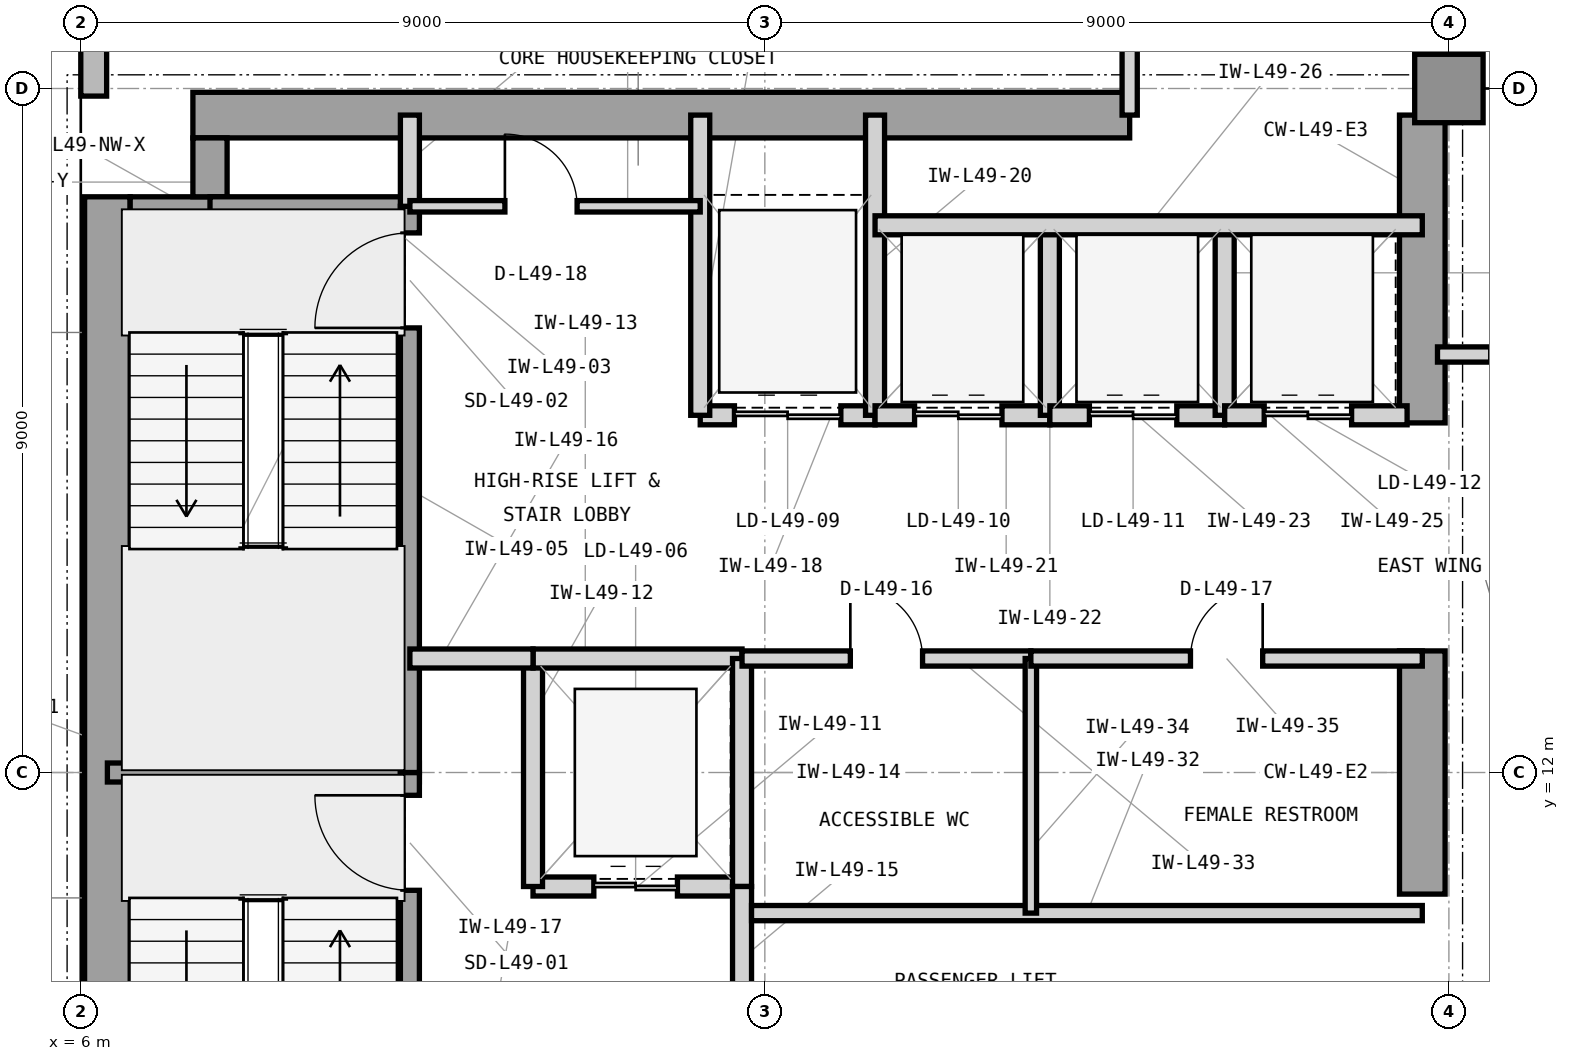
"""IFC4 building model, lengths in metres.
Left out: names, types, materials, properties, quantities, classifications, styles, units other than length and angle.
Written with IfcOpenShell. Run it as: python <this file> out.ifc"""

import sys

from ifc_helpers import new_model, si_unit, direction, frame, frame_2d, origin, origin_2d, place, context, subcontext, project, spatial, rectangle, extrude, element, fill, save


model = new_model("IFC4")
c1 = context("Model", 3, precision=1e-05, world=origin(), true_north=direction((0.0, 1.0)))
c2 = subcontext(c1, "Body", "Model", "MODEL_VIEW")
j1 = project(units=[si_unit("LENGTHUNIT", "METRE"), si_unit("PLANEANGLEUNIT", "RADIAN")], contexts=[c1])
p1 = place(None, origin())
s1 = spatial("IfcSite", under=j1, at=p1, CompositionType="ELEMENT")
p2 = place(p1, origin())
s2 = spatial("IfcBuilding", under=s1, at=p2, CompositionType="ELEMENT")
p3 = place(p2, frame((0.0, 0.0, 203.4)))
s3 = spatial("IfcBuildingStorey", under=s2, at=p3, CompositionType="ELEMENT", Elevation=203.4)
p4 = place(p3, frame((6.35, 4.425, 0.0), z_axis=(0.0, 0.0, 1.0), x_axis=(0.0, 1.0, 0.0)))
e1 = element("IfcWall", 1, at=p4, inside=s3, PredefinedType="SHEAR", context=c2, shape_type="SweptSolid", body=[
    extrude(rectangle(XDim=15.15, YDim=0.6, at=frame_2d((7.575, 0.0))), origin(), (0.0, 0.0, 1.0), 3.9),
])
p5 = place(p3, frame((7.475, 20.65, 0.0), z_axis=(0.0, 0.0, 1.0), x_axis=(1.0, 0.0, 0.0)))
e2 = element("IfcWall", 2, at=p5, inside=s3, PredefinedType="SHEAR", context=c2, shape_type="SweptSolid", body=[
    extrude(rectangle(XDim=12.325, YDim=0.6, at=frame_2d((6.163, 0.0))), origin(), (0.0, 0.0, 1.0), 3.9),
])
p6 = place(p3, frame((23.65, 10.4, 0.0), z_axis=(0.0, 0.0, 1.0), x_axis=(0.0, 1.0, 0.0)))
e3 = element("IfcWall", 3, at=p6, inside=s3, PredefinedType="SHEAR", context=c2, shape_type="SweptSolid", body=[
    extrude(rectangle(XDim=3.2, YDim=0.6, at=frame_2d((1.6, 0.0))), origin(), (0.0, 0.0, 1.0), 3.9),
])
p7 = place(p3, frame((23.65, 16.6, 0.0), z_axis=(0.0, 0.0, 1.0), x_axis=(0.0, 1.0, 0.0)))
e4 = element("IfcWall", 4, at=p7, inside=s3, PredefinedType="SHEAR", context=c2, shape_type="SweptSolid", body=[
    extrude(rectangle(XDim=4.05, YDim=0.6, at=frame_2d((2.025, 0.0))), origin(), (0.0, 0.0, 1.0), 3.9),
])
p8 = place(p3, frame((6.65, 19.35, 0.0), z_axis=(0.0, 0.0, 1.0), x_axis=(1.0, 0.0, 0.0)))
e5 = element("IfcWall", 5, at=p8, inside=s3, PredefinedType="SHEAR", context=c2, shape_type="SweptSolid", body=[
    extrude(rectangle(XDim=1.275, YDim=0.45, at=frame_2d((0.638, 0.0))), origin(), (0.0, 0.0, 1.0), 3.9),
])
p9 = place(p3, frame((7.7, 19.575, 0.0), z_axis=(0.0, 0.0, 1.0), x_axis=(0.0, 1.0, 0.0)))
e6 = element("IfcWall", 6, at=p9, inside=s3, PredefinedType="SHEAR", context=c2, shape_type="SweptSolid", body=[
    extrude(rectangle(XDim=0.775, YDim=0.45, at=frame_2d((0.388, 0.0))), origin(), (0.0, 0.0, 1.0), 3.9),
])
p10 = place(p3, frame((24.0, 21.0, 0.0), z_axis=(0.0, 0.0, 1.0), x_axis=(1.0, 0.0, 0.0)))
e7 = element("IfcColumn", 7, at=p10, inside=s3, PredefinedType="COLUMN", context=c2, shape_type="SweptSolid", body=[
    extrude(rectangle(XDim=0.9, YDim=0.9, at=origin_2d()), origin(), (0.0, 0.0, 1.0), 3.9),
])
p11 = place(p3, frame((23.83, 21.0, 0.0), z_axis=(0.0, 0.0, 1.0), x_axis=(0.0, 1.0, 0.0)))
e8 = element("IfcWall", 8, at=p11, inside=s3, PredefinedType="STANDARD", context=c2, shape_type="SweptSolid", body=[
    extrude(rectangle(XDim=19.4, YDim=0.34, at=frame_2d((9.7, 0.0))), origin(), (0.0, 0.0, 1.0), 3.7),
])
p12 = place(p3, frame((6.17, 40.4, 0.0), z_axis=(0.0, 0.0, 1.0), x_axis=(0.0, -1.0, 0.0)))
e9 = element("IfcWall", 9, at=p12, inside=s3, PredefinedType="STANDARD", context=c2, shape_type="SweptSolid", body=[
    extrude(rectangle(XDim=19.5, YDim=0.34, at=frame_2d((9.75, 0.0))), origin(), (0.0, 0.0, 1.0), 3.7),
])
p13 = place(p12, frame((7.125, 0.0, 0.9)))
e10 = element("IfcOpeningElement", 10, at=p13, cuts=e9, PredefinedType="OPENING", context=c2, shape_type="SweptSolid", body=[
    extrude(rectangle(XDim=2.3, YDim=2.2, at=frame_2d((1.15, 1.1))), frame((0.0, 0.18, 0.0), z_axis=(0.0, -1.0, 0.0), x_axis=(1.0, 0.0, 0.0)), (0.0, 0.0, 1.0), 0.36),
])
p14 = place(p3, frame((6.35, 12.0, 0.0), z_axis=(0.0, 0.0, 1.0), x_axis=(1.0, 0.0, 0.0)))
e11 = element("IfcWall", 11, at=p14, inside=s3, PredefinedType="SHEAR", context=c2, shape_type="SweptSolid", body=[
    extrude(rectangle(XDim=4.105, YDim=0.25, at=frame_2d((2.052, 0.0))), origin(), (0.0, 0.0, 1.0), 3.9),
])
p15 = place(p3, frame((7.7, 19.45, 0.0), z_axis=(0.0, 0.0, 1.0), x_axis=(1.0, 0.0, 0.0)))
e12 = element("IfcWall", 12, at=p15, inside=s3, PredefinedType="SHEAR", context=c2, shape_type="SweptSolid", body=[
    extrude(rectangle(XDim=2.755, YDim=0.25, at=frame_2d((1.377, 0.0))), origin(), (0.0, 0.0, 1.0), 3.9),
])
p16 = place(p3, frame((10.33, 4.55, 0.0), z_axis=(0.0, 0.0, 1.0), x_axis=(0.0, 1.0, 0.0)))
e13 = element("IfcWall", 13, at=p16, inside=s3, PredefinedType="SHEAR", context=c2, shape_type="SweptSolid", body=[
    extrude(rectangle(XDim=7.45, YDim=0.25, at=frame_2d((3.725, 0.0))), origin(), (0.0, 0.0, 1.0), 3.9),
])
p17 = place(p16, frame((5.9, 0.0, 0.0)))
e14 = element("IfcOpeningElement", 14, at=p17, cuts=e13, PredefinedType="OPENING", context=c2, shape_type="SweptSolid", body=[
    extrude(rectangle(XDim=1.25, YDim=2.2, at=frame_2d((0.625, 1.1))), frame((0.0, 0.135, 0.0), z_axis=(0.0, -1.0, 0.0), x_axis=(1.0, 0.0, 0.0)), (0.0, 0.0, 1.0), 0.27),
])
p18 = place(p3, frame((10.33, 12.0, 0.0), z_axis=(0.0, 0.0, 1.0), x_axis=(0.0, 1.0, 0.0)))
e15 = element("IfcWall", 15, at=p18, inside=s3, PredefinedType="SHEAR", context=c2, shape_type="SweptSolid", body=[
    extrude(rectangle(XDim=7.45, YDim=0.25, at=frame_2d((3.725, 0.0))), origin(), (0.0, 0.0, 1.0), 3.9),
])
p19 = place(p18, frame((5.85, 0.0, 0.0)))
e16 = element("IfcOpeningElement", 16, at=p19, cuts=e15, PredefinedType="OPENING", context=c2, shape_type="SweptSolid", body=[
    extrude(rectangle(XDim=1.25, YDim=2.2, at=frame_2d((0.625, 1.1))), frame((0.0, 0.135, 0.0), z_axis=(0.0, -1.0, 0.0), x_axis=(1.0, 0.0, 0.0)), (0.0, 0.0, 1.0), 0.27),
])
p20 = place(p3, frame((10.33, 19.45, 0.0), z_axis=(0.0, 0.0, 1.0), x_axis=(0.0, 1.0, 0.0)))
e17 = element("IfcWall", 17, at=p20, inside=s3, PredefinedType="PARTITIONING", context=c2, shape_type="SweptSolid", body=[
    extrude(rectangle(XDim=1.2, YDim=0.25, at=frame_2d((0.6, 0.0))), origin(), (0.0, 0.0, 1.0), 3.69),
])
p21 = place(p3, frame((11.95, 10.5, 0.0), z_axis=(0.0, 0.0, 1.0), x_axis=(1.0, 0.0, 0.0)))
e18 = element("IfcWall", 18, at=p21, inside=s3, PredefinedType="PARTITIONING", context=c2, shape_type="SweptSolid", body=[
    extrude(rectangle(XDim=2.75, YDim=0.25, at=frame_2d((1.375, 0.0))), origin(), (0.0, 0.0, 1.0), 3.283),
])
p22 = place(p21, frame((0.8, 0.0, 0.0)))
e19 = element("IfcOpeningElement", 19, at=p22, cuts=e18, PredefinedType="OPENING", context=c2, shape_type="SweptSolid", body=[
    extrude(rectangle(XDim=1.1, YDim=2.25, at=frame_2d((0.55, 1.125))), frame((0.0, 0.135, 0.0), z_axis=(0.0, -1.0, 0.0), x_axis=(1.0, 0.0, 0.0)), (0.0, 0.0, 1.0), 0.27),
])
p23 = place(p3, frame((11.95, 10.5, 0.0), z_axis=(0.0, 0.0, 1.0), x_axis=(0.0, 1.0, 0.0)))
e20 = element("IfcWall", 20, at=p23, inside=s3, PredefinedType="PARTITIONING", context=c2, shape_type="SweptSolid", body=[
    extrude(rectangle(XDim=3.0, YDim=0.25, at=frame_2d((1.5, 0.0))), origin(), (0.0, 0.0, 1.0), 3.69),
])
p24 = place(p3, frame((11.95, 13.5, 0.0), z_axis=(0.0, 0.0, 1.0), x_axis=(1.0, 0.0, 0.0)))
e21 = element("IfcWall", 21, at=p24, inside=s3, PredefinedType="PARTITIONING", context=c2, shape_type="SweptSolid", body=[
    extrude(rectangle(XDim=2.75, YDim=0.25, at=frame_2d((1.375, 0.0))), origin(), (0.0, 0.0, 1.0), 3.283),
])
p25 = place(p3, frame((14.7, 10.5, 0.0), z_axis=(0.0, 0.0, 1.0), x_axis=(0.0, 1.0, 0.0)))
e22 = element("IfcWall", 22, at=p25, inside=s3, PredefinedType="PARTITIONING", context=c2, shape_type="SweptSolid", body=[
    extrude(rectangle(XDim=3.0, YDim=0.25, at=frame_2d((1.5, 0.0))), origin(), (0.0, 0.0, 1.0), 3.69),
])
p26 = place(p3, frame((14.7, 6.7, 0.0), z_axis=(0.0, 0.0, 1.0), x_axis=(0.0, 1.0, 0.0)))
e23 = element("IfcWall", 23, at=p26, inside=s3, PredefinedType="PARTITIONING", context=c2, shape_type="SweptSolid", body=[
    extrude(rectangle(XDim=3.8, YDim=0.25, at=frame_2d((1.9, 0.0))), origin(), (0.0, 0.0, 1.0), 3.69),
])
p27 = place(p26, frame((1.3, 0.0, 0.0)))
e24 = element("IfcOpeningElement", 24, at=p27, cuts=e23, PredefinedType="OPENING", context=c2, shape_type="SweptSolid", body=[
    extrude(rectangle(XDim=1.2, YDim=2.2, at=frame_2d((0.6, 1.1))), frame((0.0, 0.135, 0.0), z_axis=(0.0, -1.0, 0.0), x_axis=(1.0, 0.0, 0.0)), (0.0, 0.0, 1.0), 0.27),
])
p28 = place(p3, frame((10.33, 13.5, 0.0), z_axis=(0.0, 0.0, 1.0), x_axis=(1.0, 0.0, 0.0)))
e25 = element("IfcWall", 25, at=p28, inside=s3, PredefinedType="PARTITIONING", context=c2, shape_type="SweptSolid", body=[
    extrude(rectangle(XDim=1.62, YDim=0.25, at=frame_2d((0.81, 0.0))), origin(), (0.0, 0.0, 1.0), 3.283),
])
p29 = place(p3, frame((14.15, 16.7, 0.0), z_axis=(0.0, 0.0, 1.0), x_axis=(1.0, 0.0, 0.0)))
e26 = element("IfcWall", 26, at=p29, inside=s3, PredefinedType="PARTITIONING", context=c2, shape_type="SweptSolid", body=[
    extrude(rectangle(XDim=2.3, YDim=0.25, at=frame_2d((1.15, 0.0))), origin(), (0.0, 0.0, 1.0), 3.283),
])
p30 = place(p29, frame((0.45, 0.0, 0.0)))
e27 = element("IfcOpeningElement", 27, at=p30, cuts=e26, PredefinedType="OPENING", context=c2, shape_type="SweptSolid", body=[
    extrude(rectangle(XDim=1.4, YDim=2.35, at=frame_2d((0.7, 1.175))), frame((0.0, 0.135, 0.0), z_axis=(0.0, -1.0, 0.0), x_axis=(1.0, 0.0, 0.0)), (0.0, 0.0, 1.0), 0.27),
])
for number, where, z_axis, x_axis in (
    (28, (14.15, 16.7, 0.0), (0.0, 0.0, 1.0), (0.0, 1.0, 0.0)),
    (29, (16.45, 16.7, 0.0), (0.0, 0.0, 1.0), (0.0, 1.0, 0.0)),
):
    element("IfcWall", number, at=place(p3, frame(where, z_axis=z_axis, x_axis=x_axis)), inside=s3, PredefinedType="PARTITIONING", context=c2, shape_type="SweptSolid", body=[
        extrude(rectangle(XDim=3.95, YDim=0.25, at=frame_2d((1.975, 0.0))), origin(), (0.0, 0.0, 1.0), 3.69),
    ])
p31 = place(p3, frame((16.45, 16.7, 0.0), z_axis=(0.0, 0.0, 1.0), x_axis=(1.0, 0.0, 0.0)))
e30 = element("IfcWall", 30, at=p31, inside=s3, PredefinedType="PARTITIONING", context=c2, shape_type="SweptSolid", body=[
    extrude(rectangle(XDim=2.3, YDim=0.25, at=frame_2d((1.15, 0.0))), origin(), (0.0, 0.0, 1.0), 3.283),
])
p32 = place(p31, frame((0.52, 0.0, 0.0)))
e31 = element("IfcOpeningElement", 31, at=p32, cuts=e30, PredefinedType="OPENING", context=c2, shape_type="SweptSolid", body=[
    extrude(rectangle(XDim=1.15, YDim=2.25, at=frame_2d((0.575, 1.125))), frame((0.0, 0.135, 0.0), z_axis=(0.0, -1.0, 0.0), x_axis=(1.0, 0.0, 0.0)), (0.0, 0.0, 1.0), 0.27),
])
p33 = place(p3, frame((18.75, 16.7, 0.0), z_axis=(0.0, 0.0, 1.0), x_axis=(0.0, 1.0, 0.0)))
e32 = element("IfcWall", 32, at=p33, inside=s3, PredefinedType="PARTITIONING", context=c2, shape_type="SweptSolid", body=[
    extrude(rectangle(XDim=2.5, YDim=0.25, at=frame_2d((1.25, 0.0))), origin(), (0.0, 0.0, 1.0), 3.69),
])
p34 = place(p3, frame((18.75, 16.7, 0.0), z_axis=(0.0, 0.0, 1.0), x_axis=(1.0, 0.0, 0.0)))
e33 = element("IfcWall", 33, at=p34, inside=s3, PredefinedType="PARTITIONING", context=c2, shape_type="SweptSolid", body=[
    extrude(rectangle(XDim=2.3, YDim=0.25, at=frame_2d((1.15, 0.0))), origin(), (0.0, 0.0, 1.0), 3.283),
])
p35 = place(p34, frame((0.52, 0.0, 0.0)))
e34 = element("IfcOpeningElement", 34, at=p35, cuts=e33, PredefinedType="OPENING", context=c2, shape_type="SweptSolid", body=[
    extrude(rectangle(XDim=1.15, YDim=2.25, at=frame_2d((0.575, 1.125))), frame((0.0, 0.135, 0.0), z_axis=(0.0, -1.0, 0.0), x_axis=(1.0, 0.0, 0.0)), (0.0, 0.0, 1.0), 0.27),
])
p36 = place(p3, frame((21.05, 16.7, 0.0), z_axis=(0.0, 0.0, 1.0), x_axis=(0.0, 1.0, 0.0)))
e35 = element("IfcWall", 35, at=p36, inside=s3, PredefinedType="PARTITIONING", context=c2, shape_type="SweptSolid", body=[
    extrude(rectangle(XDim=2.5, YDim=0.25, at=frame_2d((1.25, 0.0))), origin(), (0.0, 0.0, 1.0), 3.69),
])
p37 = place(p3, frame((21.05, 16.7, 0.0), z_axis=(0.0, 0.0, 1.0), x_axis=(1.0, 0.0, 0.0)))
e36 = element("IfcWall", 36, at=p37, inside=s3, PredefinedType="PARTITIONING", context=c2, shape_type="SweptSolid", body=[
    extrude(rectangle(XDim=2.4, YDim=0.25, at=frame_2d((1.2, 0.0))), origin(), (0.0, 0.0, 1.0), 3.283),
])
p38 = place(p37, frame((0.52, 0.0, 0.0)))
e37 = element("IfcOpeningElement", 37, at=p38, cuts=e36, PredefinedType="OPENING", context=c2, shape_type="SweptSolid", body=[
    extrude(rectangle(XDim=1.15, YDim=2.25, at=frame_2d((0.575, 1.125))), frame((0.0, 0.135, 0.0), z_axis=(0.0, -1.0, 0.0), x_axis=(1.0, 0.0, 0.0)), (0.0, 0.0, 1.0), 0.27),
])
p39 = place(p3, frame((16.45, 19.2, 0.0), z_axis=(0.0, 0.0, 1.0), x_axis=(1.0, 0.0, 0.0)))
e38 = element("IfcWall", 38, at=p39, inside=s3, PredefinedType="PARTITIONING", context=c2, shape_type="SweptSolid", body=[
    extrude(rectangle(XDim=7.2, YDim=0.25, at=frame_2d((3.6, 0.0))), origin(), (0.0, 0.0, 1.0), 3.69),
])
p40 = place(p3, frame((14.825, 10.15, 0.0), z_axis=(0.0, 0.0, 1.0), x_axis=(1.0, 0.0, 0.0)))
e39 = element("IfcWall", 39, at=p40, inside=s3, PredefinedType="PARTITIONING", context=c2, shape_type="SweptSolid", body=[
    extrude(rectangle(XDim=8.825, YDim=0.2, at=frame_2d((4.413, 0.0))), origin(), (0.0, 0.0, 1.0), 3.69),
])
p41 = place(p3, frame((14.7, 13.5, 0.0), z_axis=(0.0, 0.0, 1.0), x_axis=(1.0, 0.0, 0.0)))
e40 = element("IfcWall", 40, at=p41, inside=s3, PredefinedType="PARTITIONING", context=c2, shape_type="SweptSolid", body=[
    extrude(rectangle(XDim=3.8, YDim=0.2, at=frame_2d((1.9, 0.0))), origin(), (0.0, 0.0, 1.0), 3.283),
])
p42 = place(p41, frame((1.425, 0.0, 0.0)))
e41 = element("IfcOpeningElement", 41, at=p42, cuts=e40, PredefinedType="OPENING", context=c2, shape_type="SweptSolid", body=[
    extrude(rectangle(XDim=0.95, YDim=2.1, at=frame_2d((0.475, 1.05))), frame((0.0, 0.11, 0.0), z_axis=(0.0, -1.0, 0.0), x_axis=(1.0, 0.0, 0.0)), (0.0, 0.0, 1.0), 0.22),
])
p43 = place(p3, frame((18.5, 10.15, 0.0), z_axis=(0.0, 0.0, 1.0), x_axis=(0.0, 1.0, 0.0)))
e42 = element("IfcWall", 42, at=p43, inside=s3, PredefinedType="PARTITIONING", context=c2, shape_type="SweptSolid", body=[
    extrude(rectangle(XDim=3.35, YDim=0.15, at=frame_2d((1.675, 0.0))), origin(), (0.0, 0.0, 1.0), 3.69),
])
p44 = place(p3, frame((18.5, 13.5, 0.0), z_axis=(0.0, 0.0, 1.0), x_axis=(1.0, 0.0, 0.0)))
e43 = element("IfcWall", 43, at=p44, inside=s3, PredefinedType="PARTITIONING", context=c2, shape_type="SweptSolid", body=[
    extrude(rectangle(XDim=5.15, YDim=0.2, at=frame_2d((2.575, 0.0))), origin(), (0.0, 0.0, 1.0), 3.283),
])
p45 = place(p44, frame((2.1, 0.0, 0.0)))
e44 = element("IfcOpeningElement", 44, at=p45, cuts=e43, PredefinedType="OPENING", context=c2, shape_type="SweptSolid", body=[
    extrude(rectangle(XDim=0.95, YDim=2.1, at=frame_2d((0.475, 1.05))), frame((0.0, 0.11, 0.0), z_axis=(0.0, -1.0, 0.0), x_axis=(1.0, 0.0, 0.0)), (0.0, 0.0, 1.0), 0.22),
])
p46 = place(p3, frame((10.33, 19.45, 0.0), z_axis=(0.0, 0.0, 1.0), x_axis=(1.0, 0.0, 0.0)))
e45 = element("IfcWall", 45, at=p46, inside=s3, PredefinedType="PARTITIONING", context=c2, shape_type="SweptSolid", body=[
    extrude(rectangle(XDim=3.82, YDim=0.15, at=frame_2d((1.91, 0.0))), origin(), (0.0, 0.0, 1.0), 3.69),
])
p47 = place(p46, frame((1.25, 0.0, 0.0)))
e46 = element("IfcOpeningElement", 46, at=p47, cuts=e45, PredefinedType="OPENING", context=c2, shape_type="SweptSolid", body=[
    extrude(rectangle(XDim=0.95, YDim=2.1, at=frame_2d((0.475, 1.05))), frame((0.0, 0.085, 0.0), z_axis=(0.0, -1.0, 0.0), x_axis=(1.0, 0.0, 0.0)), (0.0, 0.0, 1.0), 0.17),
])
p48 = place(p3, frame((23.85, 17.5, 0.0), z_axis=(0.0, 0.0, 1.0), x_axis=(1.0, 0.0, 0.0)))
e47 = element("IfcWall", 47, at=p48, inside=s3, PredefinedType="PARTITIONING", context=c2, shape_type="SweptSolid", body=[
    extrude(rectangle(XDim=2.85, YDim=0.2, at=frame_2d((1.425, 0.0))), origin(), (0.0, 0.0, 1.0), 3.69),
])
p49 = place(p48, frame((0.7, 0.0, 0.0)))
e48 = element("IfcOpeningElement", 48, at=p49, cuts=e47, PredefinedType="OPENING", context=c2, shape_type="SweptSolid", body=[
    extrude(rectangle(XDim=1.0, YDim=2.15, at=frame_2d((0.5, 1.075))), frame((0.0, 0.11, 0.0), z_axis=(0.0, -1.0, 0.0), x_axis=(1.0, 0.0, 0.0)), (0.0, 0.0, 1.0), 0.22),
])
p50 = place(p3, frame((19.8, 20.65, 0.0), z_axis=(0.0, 0.0, 1.0), x_axis=(0.0, 1.0, 0.0)))
e49 = element("IfcWall", 49, at=p50, inside=s3, PredefinedType="PARTITIONING", context=c2, shape_type="SweptSolid", body=[
    extrude(rectangle(XDim=6.15, YDim=0.2, at=frame_2d((3.075, 0.0))), origin(), (0.0, 0.0, 1.0), 3.69),
])
p51 = place(p17, origin())
e50 = element("IfcDoor", 50, at=p51, inside=s3, OperationType="SINGLE_SWING_RIGHT", PredefinedType="DOOR", context=c2, shape_type="SweptSolid", body=[
    extrude(rectangle(XDim=1.25, YDim=2.2, at=frame_2d((0.625, 1.1))), frame((0.0, 0.025, 0.0), z_axis=(0.0, -1.0, 0.0), x_axis=(1.0, 0.0, 0.0)), (0.0, 0.0, 1.0), 0.05),
])
fill(e14, e50)
p52 = place(p19, origin())
e51 = element("IfcDoor", 51, at=p52, inside=s3, OperationType="SINGLE_SWING_LEFT", PredefinedType="DOOR", context=c2, shape_type="SweptSolid", body=[
    extrude(rectangle(XDim=1.25, YDim=2.2, at=frame_2d((0.625, 1.1))), frame((0.0, 0.025, 0.0), z_axis=(0.0, -1.0, 0.0), x_axis=(1.0, 0.0, 0.0)), (0.0, 0.0, 1.0), 0.05),
])
fill(e16, e51)
p53 = place(p22, origin())
e52 = element("IfcDoor", 52, at=p53, inside=s3, OperationType="DOUBLE_DOOR_SLIDING", PredefinedType="DOOR", context=c2, shape_type="SweptSolid", body=[
    extrude(rectangle(XDim=1.1, YDim=2.25, at=frame_2d((0.55, 1.125))), frame((0.0, 0.025, 0.0), z_axis=(0.0, -1.0, 0.0), x_axis=(1.0, 0.0, 0.0)), (0.0, 0.0, 1.0), 0.05),
])
fill(e19, e52)
p54 = place(p30, origin())
e53 = element("IfcDoor", 53, at=p54, inside=s3, OperationType="DOUBLE_DOOR_SLIDING", PredefinedType="DOOR", context=c2, shape_type="SweptSolid", body=[
    extrude(rectangle(XDim=1.4, YDim=2.35, at=frame_2d((0.7, 1.175))), frame((0.0, 0.025, 0.0), z_axis=(0.0, -1.0, 0.0), x_axis=(1.0, 0.0, 0.0)), (0.0, 0.0, 1.0), 0.05),
])
fill(e27, e53)
p55 = place(p32, origin())
e54 = element("IfcDoor", 54, at=p55, inside=s3, OperationType="DOUBLE_DOOR_SLIDING", PredefinedType="DOOR", context=c2, shape_type="SweptSolid", body=[
    extrude(rectangle(XDim=1.15, YDim=2.25, at=frame_2d((0.575, 1.125))), frame((0.0, 0.025, 0.0), z_axis=(0.0, -1.0, 0.0), x_axis=(1.0, 0.0, 0.0)), (0.0, 0.0, 1.0), 0.05),
])
fill(e31, e54)
p56 = place(p35, origin())
e55 = element("IfcDoor", 55, at=p56, inside=s3, OperationType="DOUBLE_DOOR_SLIDING", PredefinedType="DOOR", context=c2, shape_type="SweptSolid", body=[
    extrude(rectangle(XDim=1.15, YDim=2.25, at=frame_2d((0.575, 1.125))), frame((0.0, 0.025, 0.0), z_axis=(0.0, -1.0, 0.0), x_axis=(1.0, 0.0, 0.0)), (0.0, 0.0, 1.0), 0.05),
])
fill(e34, e55)
p57 = place(p38, origin())
e56 = element("IfcDoor", 56, at=p57, inside=s3, OperationType="DOUBLE_DOOR_SLIDING", PredefinedType="DOOR", context=c2, shape_type="SweptSolid", body=[
    extrude(rectangle(XDim=1.15, YDim=2.25, at=frame_2d((0.575, 1.125))), frame((0.0, 0.025, 0.0), z_axis=(0.0, -1.0, 0.0), x_axis=(1.0, 0.0, 0.0)), (0.0, 0.0, 1.0), 0.05),
])
fill(e37, e56)
p58 = place(p42, origin())
e57 = element("IfcDoor", 57, at=p58, inside=s3, OperationType="SINGLE_SWING_LEFT", PredefinedType="DOOR", context=c2, shape_type="SweptSolid", body=[
    extrude(rectangle(XDim=0.95, YDim=2.1, at=frame_2d((0.475, 1.05))), frame((0.0, 0.025, 0.0), z_axis=(0.0, -1.0, 0.0), x_axis=(1.0, 0.0, 0.0)), (0.0, 0.0, 1.0), 0.05),
])
fill(e41, e57)
p59 = place(p45, origin())
e58 = element("IfcDoor", 58, at=p59, inside=s3, OperationType="SINGLE_SWING_RIGHT", PredefinedType="DOOR", context=c2, shape_type="SweptSolid", body=[
    extrude(rectangle(XDim=0.95, YDim=2.1, at=frame_2d((0.475, 1.05))), frame((0.0, 0.025, 0.0), z_axis=(0.0, -1.0, 0.0), x_axis=(1.0, 0.0, 0.0)), (0.0, 0.0, 1.0), 0.05),
])
fill(e44, e58)
p60 = place(p47, origin())
e59 = element("IfcDoor", 59, at=p60, inside=s3, OperationType="SINGLE_SWING_LEFT", PredefinedType="DOOR", context=c2, shape_type="SweptSolid", body=[
    extrude(rectangle(XDim=0.95, YDim=2.1, at=frame_2d((0.475, 1.05))), frame((0.0, 0.025, 0.0), z_axis=(0.0, -1.0, 0.0), x_axis=(1.0, 0.0, 0.0)), (0.0, 0.0, 1.0), 0.05),
])
fill(e46, e59)
save(model, sys.argv[1])
